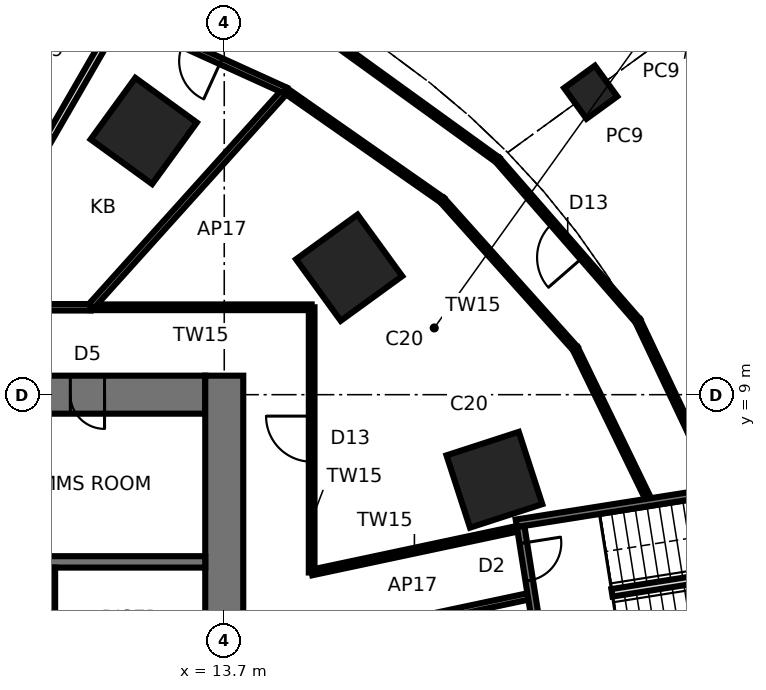
"""IFC4 building model, lengths in metres.
Left out: names, types, materials, properties, quantities, classifications, styles, units other than length and angle.
Written with IfcOpenShell. Run it as: python <this file> out.ifc"""

import sys

from ifc_helpers import new_model, si_unit, direction, frame, frame_2d, origin, origin_2d, place, context, subcontext, project, spatial, rectangle, extrude, element, fill, save


model = new_model("IFC4")
c1 = context("Model", 3, precision=1e-05, world=origin(), true_north=direction((0.0, 1.0)))
c2 = subcontext(c1, "Body", "Model", "MODEL_VIEW")
j1 = project(units=[si_unit("LENGTHUNIT", "METRE"), si_unit("PLANEANGLEUNIT", "RADIAN")], contexts=[c1])
p1 = place(None, origin())
s1 = spatial("IfcSite", under=j1, at=p1, CompositionType="ELEMENT")
p2 = place(p1, origin())
s2 = spatial("IfcBuilding", under=s1, at=p2, CompositionType="ELEMENT")
p3 = place(p2, frame((0.0, 0.0, 10.6)))
s3 = spatial("IfcBuildingStorey", under=s2, at=p3, CompositionType="ELEMENT", Elevation=10.6)
for number, where, z_axis, x_axis in (
    (1, (20.808, 6.761, 0.0), (0.0, 0.0, 1.0), (0.951, 0.309, 0.0)),
    (2, (16.986, 12.341, 0.0), (0.0, 0.0, 1.0), (0.809, 0.588, 0.0)),
    (3, (11.581, 15.94, 0.0), (0.0, 0.0, 1.0), (0.588, 0.809, 0.0)),
):
    element("IfcColumn", number, at=place(p3, frame(where, z_axis=z_axis, x_axis=x_axis)), inside=s3, PredefinedType="COLUMN", context=c2, shape_type="SweptSolid", body=[
        extrude(rectangle(XDim=2.0, YDim=2.0, at=origin_2d()), origin(), (0.0, 0.0, 1.0), 4.5),
    ])
p4 = place(p3, frame((23.342, 16.959, 0.0), z_axis=(0.0, 0.0, 1.0), x_axis=(0.809016994375, 0.587785252292, 0.0)))
e4 = element("IfcColumn", 4, at=p4, inside=s3, PredefinedType="COLUMN", context=c2, shape_type="SweptSolid", body=[
    extrude(rectangle(XDim=1.0, YDim=1.0, at=origin_2d()), origin(), (0.0, 0.0, 1.0), 4.5),
])
p5 = place(p3, frame((13.2, 9.0, 0.0), z_axis=(0.0, 0.0, 1.0), x_axis=(-1.0, 0.0, 0.0)))
e5 = element("IfcWall", 5, at=p5, inside=s3, PredefinedType="SHEAR", context=c2, shape_type="SweptSolid", body=[
    extrude(rectangle(XDim=26.4, YDim=1.0, at=frame_2d((13.2, 0.0))), origin(), (0.0, 0.0, 1.0), 4.5),
])
p6 = place(p5, frame((2.65, 0.0, 0.0)))
e6 = element("IfcOpeningElement", 6, at=p6, cuts=e5, PredefinedType="OPENING", context=c2, shape_type="SweptSolid", body=[
    extrude(rectangle(XDim=0.9, YDim=2.1, at=frame_2d((0.45, 1.05))), frame((0.0, 0.51, 0.0), z_axis=(0.0, -1.0, 0.0), x_axis=(1.0, 0.0, 0.0)), (0.0, 0.0, 1.0), 1.02),
])
p7 = place(p5, frame((9.5, 0.0, 0.0)))
e7 = element("IfcOpeningElement", 7, at=p7, cuts=e5, PredefinedType="OPENING", context=c2, shape_type="SweptSolid", body=[
    extrude(rectangle(XDim=0.9, YDim=2.1, at=frame_2d((0.45, 1.05))), frame((0.0, 0.51, 0.0), z_axis=(0.0, -1.0, 0.0), x_axis=(1.0, 0.0, 0.0)), (0.0, 0.0, 1.0), 1.02),
])
p8 = place(p5, frame((16.0, 0.0, 0.0)))
e8 = element("IfcOpeningElement", 8, at=p8, cuts=e5, PredefinedType="OPENING", context=c2, shape_type="SweptSolid", body=[
    extrude(rectangle(XDim=0.9, YDim=2.1, at=frame_2d((0.45, 1.05))), frame((0.0, 0.51, 0.0), z_axis=(0.0, -1.0, 0.0), x_axis=(1.0, 0.0, 0.0)), (0.0, 0.0, 1.0), 1.02),
])
p9 = place(p5, frame((21.25, 0.0, 0.0)))
e9 = element("IfcOpeningElement", 9, at=p9, cuts=e5, PredefinedType="OPENING", context=c2, shape_type="SweptSolid", body=[
    extrude(rectangle(XDim=0.9, YDim=2.1, at=frame_2d((0.45, 1.05))), frame((0.0, 0.51, 0.0), z_axis=(0.0, -1.0, 0.0), x_axis=(1.0, 0.0, 0.0)), (0.0, 0.0, 1.0), 1.02),
])
p10 = place(p5, frame((24.8, 0.0, 0.0)))
e10 = element("IfcOpeningElement", 10, at=p10, cuts=e5, PredefinedType="OPENING", context=c2, shape_type="SweptSolid", body=[
    extrude(rectangle(XDim=1.0, YDim=2.1, at=frame_2d((0.5, 1.05))), frame((0.0, 0.51, 0.0), z_axis=(0.0, -1.0, 0.0), x_axis=(1.0, 0.0, 0.0)), (0.0, 0.0, 1.0), 1.02),
])
p11 = place(p3, frame((13.7, -9.5, 0.0), z_axis=(0.0, 0.0, 1.0), x_axis=(0.0, 1.0, 0.0)))
e11 = element("IfcWall", 11, at=p11, inside=s3, PredefinedType="SHEAR", context=c2, shape_type="SweptSolid", body=[
    extrude(rectangle(XDim=19.0, YDim=1.0, at=frame_2d((9.5, 0.0))), origin(), (0.0, 0.0, 1.0), 4.5),
])
p12 = place(p11, frame((8.6, 0.0, 0.0)))
e12 = element("IfcOpeningElement", 12, at=p12, cuts=e11, PredefinedType="OPENING", context=c2, shape_type="SweptSolid", body=[
    extrude(rectangle(XDim=1.8, YDim=2.4, at=frame_2d((0.9, 1.2))), frame((0.0, 0.51, 0.0), z_axis=(0.0, -1.0, 0.0), x_axis=(1.0, 0.0, 0.0)), (0.0, 0.0, 1.0), 1.02),
])
p13 = place(p3, frame((-13.2, 4.6, 0.0), z_axis=(0.0, 0.0, 1.0), x_axis=(1.0, 0.0, 0.0)))
e13 = element("IfcWall", 13, at=p13, inside=s3, PredefinedType="SHEAR", context=c2, shape_type="SweptSolid", body=[
    extrude(rectangle(XDim=26.4, YDim=0.3, at=frame_2d((13.2, 0.0))), origin(), (0.0, 0.0, 1.0), 4.5),
])
p14 = place(p3, frame((9.1, 1.75, 0.0), z_axis=(0.0, 0.0, 1.0), x_axis=(0.0, 1.0, 0.0)))
e14 = element("IfcWall", 14, at=p14, inside=s3, PredefinedType="SHEAR", context=c2, shape_type="SweptSolid", body=[
    extrude(rectangle(XDim=2.7, YDim=0.3, at=frame_2d((1.35, 0.0))), origin(), (0.0, 0.0, 1.0), 4.5),
])
p15 = place(p3, frame((16.0, 2.481, 0.0), z_axis=(0.0, 0.0, 1.0), x_axis=(0.978144448143, 0.207926522038, 0.0)))
e15 = element("IfcWall", 15, at=p15, inside=s3, PredefinedType="PARTITIONING", context=c2, shape_type="SweptSolid", body=[
    extrude(rectangle(XDim=5.817, YDim=0.17, at=frame_2d((2.908, 0.0))), origin(), (0.0, 0.0, 1.0), 4.3),
])
p16 = place(p3, frame((21.408, 5.47, 0.0), z_axis=(0.0, 0.0, 1.0), x_axis=(-0.978148748832, -0.207906289368, 0.0)))
e16 = element("IfcWall", 16, at=p16, inside=s3, PredefinedType="PARTITIONING", context=c2, shape_type="SweptSolid", body=[
    extrude(rectangle(XDim=5.529, YDim=0.15, at=frame_2d((2.764, 0.0))), origin(), (0.0, 0.0, 1.0), 4.3),
])
p17 = place(p3, frame((26.666, 6.552, 0.0), z_axis=(0.0, 0.0, 1.0), x_axis=(-0.428597870995, 0.903495359688, 0.0)))
e17 = element("IfcWall", 17, at=p17, inside=s3, PredefinedType="PARTITIONING", context=c2, shape_type="SweptSolid", body=[
    extrude(rectangle(XDim=4.862, YDim=0.15, at=frame_2d((2.431, 0.0))), origin(), (0.0, 0.0, 1.0), 4.3),
])
p18 = place(p3, frame((22.938, 10.212, 0.0), z_axis=(0.0, 0.0, 1.0), x_axis=(0.436655701608, -0.899628700217, 0.0)))
e18 = element("IfcWall", 18, at=p18, inside=s3, PredefinedType="PARTITIONING", context=c2, shape_type="SweptSolid", body=[
    extrude(rectangle(XDim=4.388, YDim=0.15, at=frame_2d((2.194, 0.0))), origin(), (0.0, 0.0, 1.0), 4.3),
])
p19 = place(p3, frame((16.0, 4.321, 0.0), z_axis=(0.0, 0.0, 1.0), x_axis=(0.0, 1.0, 0.0)))
e19 = element("IfcWall", 19, at=p19, inside=s3, PredefinedType="PARTITIONING", context=c2, shape_type="SweptSolid", body=[
    extrude(rectangle(XDim=6.979, YDim=0.15, at=frame_2d((3.49, 0.0))), origin(), (0.0, 0.0, 1.0), 4.3),
])
p20 = place(p19, frame((2.915, 0.0, 0.0)))
e20 = element("IfcOpeningElement", 20, at=p20, cuts=e19, PredefinedType="OPENING", context=c2, shape_type="SweptSolid", body=[
    extrude(rectangle(XDim=1.2, YDim=2.4, at=frame_2d((0.6, 1.2))), frame((0.0, 0.085, 0.0), z_axis=(0.0, -1.0, 0.0), x_axis=(1.0, 0.0, 0.0)), (0.0, 0.0, 1.0), 0.17),
])
p21 = place(p3, frame((19.436, 14.121, 0.0), z_axis=(0.0, 0.0, 1.0), x_axis=(0.667266603128, -0.744818958103, 0.0)))
e21 = element("IfcWall", 21, at=p21, inside=s3, PredefinedType="PARTITIONING", context=c2, shape_type="SweptSolid", body=[
    extrude(rectangle(XDim=5.248, YDim=0.15, at=frame_2d((2.624, 0.0))), origin(), (0.0, 0.0, 1.0), 4.3),
])
p22 = place(p3, frame((24.582, 10.945, 0.0), z_axis=(0.0, 0.0, 1.0), x_axis=(-0.656952161656, 0.753932263069, 0.0)))
e22 = element("IfcWall", 22, at=p22, inside=s3, PredefinedType="PARTITIONING", context=c2, shape_type="SweptSolid", body=[
    extrude(rectangle(XDim=5.616, YDim=0.15, at=frame_2d((2.808, 0.0))), origin(), (0.0, 0.0, 1.0), 4.3),
])
p23 = place(p22, frame((2.208, 0.0, 0.0)))
e23 = element("IfcOpeningElement", 23, at=p23, cuts=e22, PredefinedType="OPENING", context=c2, shape_type="SweptSolid", body=[
    extrude(rectangle(XDim=1.2, YDim=2.4, at=frame_2d((0.6, 1.2))), frame((0.0, 0.085, 0.0), z_axis=(0.0, -1.0, 0.0), x_axis=(1.0, 0.0, 0.0)), (0.0, 0.0, 1.0), 0.17),
])
p24 = place(p3, frame((16.0, 11.3, 0.0), z_axis=(0.0, 0.0, 1.0), x_axis=(-1.0, 0.0, 0.0)))
e24 = element("IfcWall", 24, at=p24, inside=s3, PredefinedType="PARTITIONING", context=c2, shape_type="SweptSolid", body=[
    extrude(rectangle(XDim=5.825, YDim=0.15, at=frame_2d((2.913, 0.0))), origin(), (0.0, 0.0, 1.0), 4.3),
])
p25 = place(p3, frame((15.311, 17.004, 0.0), z_axis=(0.0, 0.0, 1.0), x_axis=(0.819662413359, -0.572846862719, 0.0)))
e25 = element("IfcWall", 25, at=p25, inside=s3, PredefinedType="PARTITIONING", context=c2, shape_type="SweptSolid", body=[
    extrude(rectangle(XDim=5.033, YDim=0.15, at=frame_2d((2.517, 0.0))), origin(), (0.0, 0.0, 1.0), 4.3),
])
p26 = place(p3, frame((20.892, 15.179, 0.0), z_axis=(0.0, 0.0, 1.0), x_axis=(-0.810528990045, 0.585698519971, 0.0)))
e26 = element("IfcWall", 26, at=p26, inside=s3, PredefinedType="PARTITIONING", context=c2, shape_type="SweptSolid", body=[
    extrude(rectangle(XDim=5.4, YDim=0.15, at=frame_2d((2.7, 0.0))), origin(), (0.0, 0.0, 1.0), 4.3),
])
p27 = place(p3, frame((10.175, 11.3, 0.0), z_axis=(0.0, 0.0, 1.0), x_axis=(0.669129902119, 0.743145459577, 0.0)))
e27 = element("IfcWall", 27, at=p27, inside=s3, PredefinedType="PARTITIONING", context=c2, shape_type="SweptSolid", body=[
    extrude(rectangle(XDim=7.676, YDim=0.17, at=frame_2d((3.838, 0.0))), origin(), (0.0, 0.0, 1.0), 4.3),
])
p28 = place(p3, frame((10.175, 11.3, 0.0), z_axis=(0.0, 0.0, 1.0), x_axis=(-1.0, 0.0, 0.0)))
e28 = element("IfcWall", 28, at=p28, inside=s3, PredefinedType="PARTITIONING", context=c2, shape_type="SweptSolid", body=[
    extrude(rectangle(XDim=3.65, YDim=0.17, at=frame_2d((1.825, 0.0))), origin(), (0.0, 0.0, 1.0), 4.3),
])
p29 = place(p3, frame((10.96, 18.983, 0.0), z_axis=(0.0, 0.0, 1.0), x_axis=(0.91025098655, -0.414056930246, 0.0)))
e29 = element("IfcWall", 29, at=p29, inside=s3, PredefinedType="PARTITIONING", context=c2, shape_type="SweptSolid", body=[
    extrude(rectangle(XDim=4.78, YDim=0.17, at=frame_2d((2.39, 0.0))), origin(), (0.0, 0.0, 1.0), 4.3),
])
p30 = place(p29, frame((1.815, 0.0, 0.0)))
e30 = element("IfcOpeningElement", 30, at=p30, cuts=e29, PredefinedType="OPENING", context=c2, shape_type="SweptSolid", body=[
    extrude(rectangle(XDim=1.1, YDim=2.4, at=frame_2d((0.55, 1.2))), frame((0.0, 0.095, 0.0), z_axis=(0.0, -1.0, 0.0), x_axis=(1.0, 0.0, 0.0)), (0.0, 0.0, 1.0), 0.19),
])
p31 = place(p3, frame((6.524, 11.3, 0.0), z_axis=(0.0, 0.0, 1.0), x_axis=(0.499995604398, 0.866027941571, 0.0)))
e31 = element("IfcWall", 31, at=p31, inside=s3, PredefinedType="SOLIDWALL", context=c2, shape_type="SweptSolid", body=[
    extrude(rectangle(XDim=8.872, YDim=0.19, at=frame_2d((4.436, 0.0))), origin(), (0.0, 0.0, 1.0), 4.3),
])
p32 = place(p3, frame((21.385, 5.615, 0.0), z_axis=(0.0, 0.0, 1.0), x_axis=(0.987689398324, 0.156427786655, 0.0)))
e32 = element("IfcWall", 32, at=p32, inside=s3, PredefinedType="SOLIDWALL", context=c2, shape_type="SweptSolid", body=[
    extrude(rectangle(XDim=8.3, YDim=0.2, at=frame_2d((4.15, 0.0))), origin(), (0.0, 0.0, 1.0), 4.3),
])
p33 = place(p3, frame((22.156, 1.383, 0.0), z_axis=(0.0, 0.0, 1.0), x_axis=(-0.156428225752, 0.987689328781, 0.0)))
e33 = element("IfcWall", 33, at=p33, inside=s3, PredefinedType="SOLIDWALL", context=c2, shape_type="SweptSolid", body=[
    extrude(rectangle(XDim=4.2, YDim=0.2, at=frame_2d((2.1, 0.0))), origin(), (0.0, 0.0, 1.0), 4.3),
])
p34 = place(p33, frame((2.76, 0.0, 0.0)))
e34 = element("IfcOpeningElement", 34, at=p34, cuts=e33, PredefinedType="OPENING", context=c2, shape_type="SweptSolid", body=[
    extrude(rectangle(XDim=1.0, YDim=2.1, at=frame_2d((0.5, 1.05))), frame((0.0, 0.11, 0.0), z_axis=(0.0, -1.0, 0.0), x_axis=(1.0, 0.0, 0.0)), (0.0, 0.0, 1.0), 0.22),
])
p35 = place(p3, frame((23.902, 3.786, 0.0), z_axis=(0.0, 0.0, 1.0), x_axis=(0.987682173263, 0.156473399078, 0.0)))
e35 = element("IfcWall", 35, at=p35, inside=s3, PredefinedType="SOLIDWALL", context=c2, shape_type="SweptSolid", body=[
    extrude(rectangle(XDim=3.804, YDim=0.2, at=frame_2d((1.902, 0.0))), origin(), (0.0, 0.0, 1.0), 4.5),
])
p36 = place(p6, origin())
e36 = element("IfcDoor", 36, at=p36, inside=s3, OperationType="SINGLE_SWING_LEFT", PredefinedType="DOOR", context=c2, shape_type="SweptSolid", body=[
    extrude(rectangle(XDim=0.82, YDim=2.06, at=frame_2d((0.45, 1.03))), frame((0.0, 0.025, 0.0), z_axis=(0.0, -1.0, 0.0), x_axis=(1.0, 0.0, 0.0)), (0.0, 0.0, 1.0), 0.05),
    extrude(rectangle(XDim=0.04, YDim=2.1, at=frame_2d((0.02, 1.05))), frame((0.0, 0.25, 0.0), z_axis=(0.0, -1.0, 0.0), x_axis=(1.0, 0.0, 0.0)), (0.0, 0.0, 1.0), 0.5),
    extrude(rectangle(XDim=0.04, YDim=2.1, at=frame_2d((0.88, 1.05))), frame((0.0, 0.25, 0.0), z_axis=(0.0, -1.0, 0.0), x_axis=(1.0, 0.0, 0.0)), (0.0, 0.0, 1.0), 0.5),
    extrude(rectangle(XDim=0.82, YDim=0.04, at=frame_2d((0.45, 2.08))), frame((0.0, 0.25, 0.0), z_axis=(0.0, -1.0, 0.0), x_axis=(1.0, 0.0, 0.0)), (0.0, 0.0, 1.0), 0.5),
])
fill(e6, e36)
p37 = place(p20, origin())
e37 = element("IfcDoor", 37, at=p37, inside=s3, OperationType="SINGLE_SWING_RIGHT", PredefinedType="DOOR", context=c2, shape_type="SweptSolid", body=[
    extrude(rectangle(XDim=1.2, YDim=2.4, at=frame_2d((0.6, 1.2))), frame((0.0, 0.025, 0.0), z_axis=(0.0, -1.0, 0.0), x_axis=(1.0, 0.0, 0.0)), (0.0, 0.0, 1.0), 0.05),
])
fill(e20, e37)
p38 = place(p30, frame((1.1, 0.0, 0.0), z_axis=(0.0, 0.0, 1.0), x_axis=(-1.0, 0.0, 0.0)))
e38 = element("IfcDoor", 38, at=p38, inside=s3, OperationType="SINGLE_SWING_LEFT", PredefinedType="DOOR", context=c2, shape_type="SweptSolid", body=[
    extrude(rectangle(XDim=1.1, YDim=2.4, at=frame_2d((0.55, 1.2))), frame((0.0, 0.025, 0.0), z_axis=(0.0, -1.0, 0.0), x_axis=(1.0, 0.0, 0.0)), (0.0, 0.0, 1.0), 0.05),
])
fill(e30, e38)
p39 = place(p23, origin())
e39 = element("IfcDoor", 39, at=p39, inside=s3, OperationType="SINGLE_SWING_LEFT", PredefinedType="DOOR", context=c2, shape_type="SweptSolid", body=[
    extrude(rectangle(XDim=1.2, YDim=2.4, at=frame_2d((0.6, 1.2))), frame((0.0, 0.025, 0.0), z_axis=(0.0, -1.0, 0.0), x_axis=(1.0, 0.0, 0.0)), (0.0, 0.0, 1.0), 0.05),
])
fill(e23, e39)
p40 = place(p34, frame((1.0, 0.0, 0.0), z_axis=(0.0, 0.0, 1.0), x_axis=(-1.0, 0.0, 0.0)))
e40 = element("IfcDoor", 40, at=p40, inside=s3, OperationType="SINGLE_SWING_LEFT", PredefinedType="DOOR", context=c2, shape_type="SweptSolid", body=[
    extrude(rectangle(XDim=1.0, YDim=2.1, at=frame_2d((0.5, 1.05))), frame((0.0, 0.025, 0.0), z_axis=(0.0, -1.0, 0.0), x_axis=(1.0, 0.0, 0.0)), (0.0, 0.0, 1.0), 0.05),
])
fill(e34, e40)
save(model, sys.argv[1])
